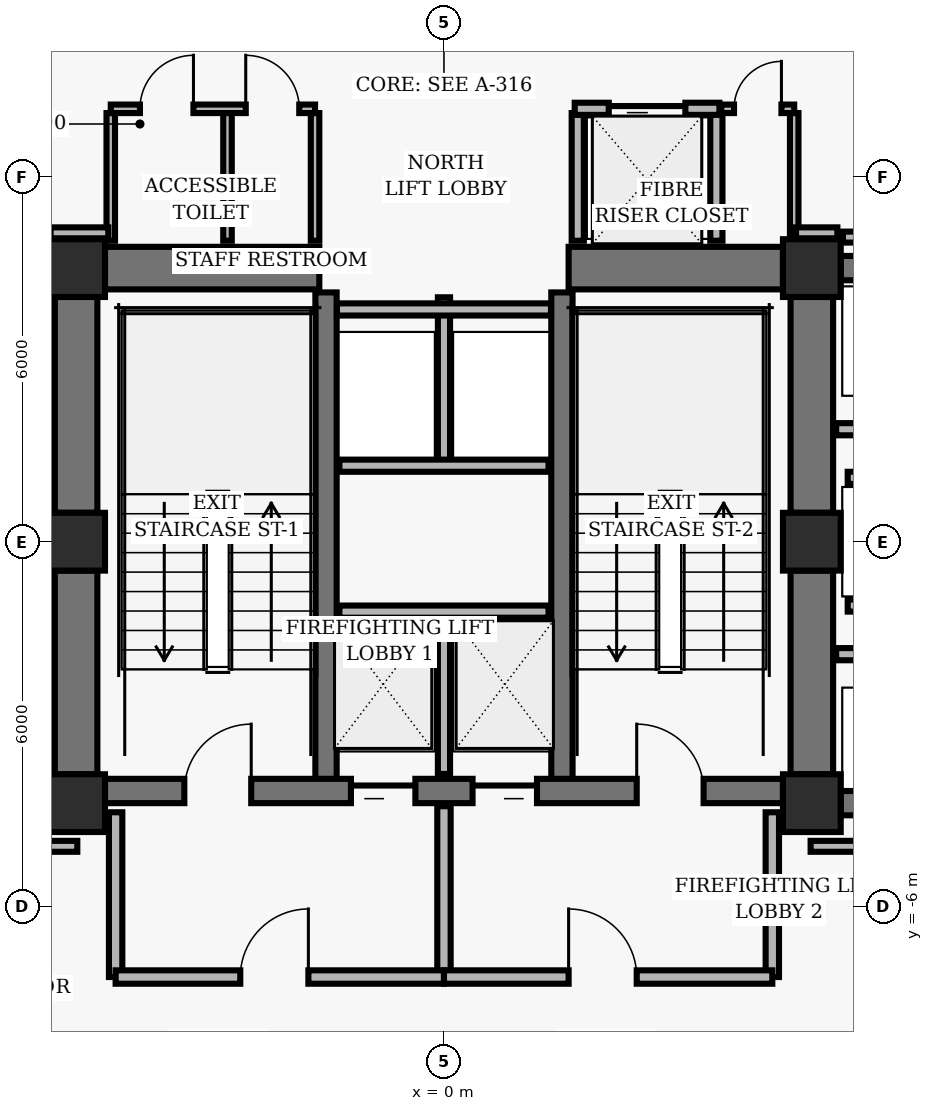
"""IFC4 building model, lengths in metres.
Left out: names, types, materials, properties, quantities, classifications, styles, units other than length and angle.
Written with IfcOpenShell. Run it as: python <this file> out.ifc"""

import sys

from ifc_helpers import new_model, si_unit, direction, frame, frame_2d, origin, origin_2d, place, context, subcontext, project, spatial, rectangle, hollow_rectangle, extrude, element, fill, save


model = new_model("IFC4")
c1 = context("Model", 3, precision=1e-05, world=origin(), true_north=direction((0.0, 1.0)))
c2 = subcontext(c1, "Body", "Model", "MODEL_VIEW")
j1 = project(units=[si_unit("LENGTHUNIT", "METRE"), si_unit("PLANEANGLEUNIT", "RADIAN")], contexts=[c1])
p1 = place(None, origin())
s1 = spatial("IfcSite", under=j1, at=p1, CompositionType="ELEMENT")
p2 = place(p1, origin())
s2 = spatial("IfcBuilding", under=s1, at=p2, CompositionType="ELEMENT")
p3 = place(p2, frame((0.0, 0.0, 59.68)))
s3 = spatial("IfcBuildingStorey", under=s2, at=p3, CompositionType="ELEMENT", Elevation=59.68)
for number, where, z_axis, x_axis in (
    (1, (-6.05, 4.5, 0.0), (0.0, 0.0, 1.0), (1.0, 0.0, 0.0)),
    (2, (6.05, 4.5, 0.0), (0.0, 0.0, 1.0), (1.0, 0.0, 0.0)),
    (3, (-6.05, 0.0, 0.0), (0.0, 0.0, 1.0), (1.0, 0.0, 0.0)),
    (4, (6.05, 0.0, 0.0), (0.0, 0.0, 1.0), (1.0, 0.0, 0.0)),
    (5, (-6.05, -4.3, 0.0), (0.0, 0.0, 1.0), (1.0, 0.0, 0.0)),
    (6, (6.05, -4.3, 0.0), (0.0, 0.0, 1.0), (1.0, 0.0, 0.0)),
):
    element("IfcColumn", number, at=place(p3, frame(where, z_axis=z_axis, x_axis=x_axis)), inside=s3, PredefinedType="COLUMN", context=c2, shape_type="SweptSolid", body=[
        extrude(hollow_rectangle(XDim=0.95, YDim=0.95, WallThickness=0.06, InnerFilletRadius=0.02, OuterFilletRadius=0.04, at=origin_2d()), origin(), (0.0, 0.0, 1.0), 3.36),
    ])
p4 = place(p3, frame((-6.05, 0.475, 0.0), z_axis=(0.0, 0.0, 1.0), x_axis=(0.0, 1.0, 0.0)))
e7 = element("IfcWall", 7, at=p4, inside=s3, PredefinedType="SHEAR", context=c2, shape_type="SweptSolid", body=[
    extrude(rectangle(XDim=3.55, YDim=0.7, at=frame_2d((1.775, 0.0))), origin(), (0.0, 0.0, 1.0), 3.098),
])
p5 = place(p3, frame((-6.05, -3.825, 0.0), z_axis=(0.0, 0.0, 1.0), x_axis=(0.0, 1.0, 0.0)))
e8 = element("IfcWall", 8, at=p5, inside=s3, PredefinedType="SHEAR", context=c2, shape_type="SweptSolid", body=[
    extrude(rectangle(XDim=3.35, YDim=0.7, at=frame_2d((1.675, 0.0))), origin(), (0.0, 0.0, 1.0), 3.098),
])
p6 = place(p3, frame((6.05, 0.475, 0.0), z_axis=(0.0, 0.0, 1.0), x_axis=(0.0, 1.0, 0.0)))
e9 = element("IfcWall", 9, at=p6, inside=s3, PredefinedType="SHEAR", context=c2, shape_type="SweptSolid", body=[
    extrude(rectangle(XDim=3.55, YDim=0.7, at=frame_2d((1.775, 0.0))), origin(), (0.0, 0.0, 1.0), 3.098),
])
p7 = place(p3, frame((6.05, -3.825, 0.0), z_axis=(0.0, 0.0, 1.0), x_axis=(0.0, 1.0, 0.0)))
e10 = element("IfcWall", 10, at=p7, inside=s3, PredefinedType="SHEAR", context=c2, shape_type="SweptSolid", body=[
    extrude(rectangle(XDim=3.35, YDim=0.7, at=frame_2d((1.675, 0.0))), origin(), (0.0, 0.0, 1.0), 3.098),
])
for number, where, z_axis, x_axis in (
    (11, (-1.94, -4.1, 0.0), (0.0, 0.0, 1.0), (0.0, 1.0, 0.0)),
    (12, (1.94, -4.1, 0.0), (0.0, 0.0, 1.0), (0.0, 1.0, 0.0)),
):
    element("IfcWall", number, at=place(p3, frame(where, z_axis=z_axis, x_axis=x_axis)), inside=s3, PredefinedType="SHEAR", context=c2, shape_type="SweptSolid", body=[
        extrude(rectangle(XDim=8.2, YDim=0.35, at=frame_2d((4.1, 0.0))), origin(), (0.0, 0.0, 1.0), 3.098),
    ])
p8 = place(p3, frame((-5.575, -4.1, 0.0), z_axis=(0.0, 0.0, 1.0), x_axis=(1.0, 0.0, 0.0)))
e13 = element("IfcWall", 13, at=p8, inside=s3, PredefinedType="SHEAR", context=c2, shape_type="SweptSolid", body=[
    extrude(rectangle(XDim=11.15, YDim=0.4, at=frame_2d((5.575, 0.0))), origin(), (0.0, 0.0, 1.0), 3.098),
])
p9 = place(p8, frame((1.305, 0.0, 0.0)))
e14 = element("IfcOpeningElement", 14, at=p9, cuts=e13, PredefinedType="OPENING", context=c2, shape_type="SweptSolid", body=[
    extrude(rectangle(XDim=1.1, YDim=2.04, at=frame_2d((0.55, 1.02))), frame((0.0, 0.21, 0.0), z_axis=(0.0, -1.0, 0.0), x_axis=(1.0, 0.0, 0.0)), (0.0, 0.0, 1.0), 0.42),
])
p10 = place(p8, frame((8.745, 0.0, 0.0)))
e15 = element("IfcOpeningElement", 15, at=p10, cuts=e13, PredefinedType="OPENING", context=c2, shape_type="SweptSolid", body=[
    extrude(rectangle(XDim=1.1, YDim=2.04, at=frame_2d((0.55, 1.02))), frame((0.0, 0.21, 0.0), z_axis=(0.0, -1.0, 0.0), x_axis=(1.0, 0.0, 0.0)), (0.0, 0.0, 1.0), 0.42),
])
p11 = place(p8, frame((4.045, 0.0, 0.0)))
e16 = element("IfcOpeningElement", 16, at=p11, cuts=e13, PredefinedType="OPENING", context=c2, shape_type="SweptSolid", body=[
    extrude(rectangle(XDim=1.06, YDim=2.04, at=frame_2d((0.53, 1.02))), frame((0.0, 0.21, 0.0), z_axis=(0.0, -1.0, 0.0), x_axis=(1.0, 0.0, 0.0)), (0.0, 0.0, 1.0), 0.42),
])
p12 = place(p8, frame((6.045, 0.0, 0.0)))
e17 = element("IfcOpeningElement", 17, at=p12, cuts=e13, PredefinedType="OPENING", context=c2, shape_type="SweptSolid", body=[
    extrude(rectangle(XDim=1.06, YDim=2.04, at=frame_2d((0.53, 1.02))), frame((0.0, 0.21, 0.0), z_axis=(0.0, -1.0, 0.0), x_axis=(1.0, 0.0, 0.0)), (0.0, 0.0, 1.0), 0.42),
])
for number, where, z_axis, x_axis in (
    (18, (-5.575, 4.5, 0.0), (0.0, 0.0, 1.0), (1.0, 0.0, 0.0)),
    (19, (2.05, 4.5, 0.0), (0.0, 0.0, 1.0), (1.0, 0.0, 0.0)),
):
    element("IfcWall", number, at=place(p3, frame(where, z_axis=z_axis, x_axis=x_axis)), inside=s3, PredefinedType="SHEAR", context=c2, shape_type="SweptSolid", body=[
        extrude(rectangle(XDim=3.525, YDim=0.7, at=frame_2d((1.762, 0.0))), origin(), (0.0, 0.0, 1.0), 3.098),
    ])
for number, where, z_axis, x_axis in (
    (20, (6.525, 4.5, 0.0), (0.0, 0.0, 1.0), (1.0, 0.0, 0.0)),
    (21, (6.525, -4.3, 0.0), (0.0, 0.0, 1.0), (1.0, 0.0, 0.0)),
):
    element("IfcWall", number, at=place(p3, frame(where, z_axis=z_axis, x_axis=x_axis)), inside=s3, PredefinedType="SHEAR", context=c2, shape_type="SweptSolid", body=[
        extrude(rectangle(XDim=1.95, YDim=0.4, at=frame_2d((0.975, 0.0))), origin(), (0.0, 0.0, 1.0), 3.098),
    ])
p13 = place(p3, frame((0.0, -3.82, 0.0), z_axis=(0.0, 0.0, 1.0), x_axis=(0.0, 1.0, 0.0)))
e22 = element("IfcWall", 22, at=p13, inside=s3, PredefinedType="PARTITIONING", context=c2, shape_type="SweptSolid", body=[
    extrude(rectangle(XDim=2.67, YDim=0.2, at=frame_2d((1.335, 0.0))), origin(), (0.0, 0.0, 1.0), 3.073),
])
p14 = place(p3, frame((-1.72, -1.15, 0.0), z_axis=(0.0, 0.0, 1.0), x_axis=(1.0, 0.0, 0.0)))
e23 = element("IfcWall", 23, at=p14, inside=s3, PredefinedType="PARTITIONING", context=c2, shape_type="SweptSolid", body=[
    extrude(rectangle(XDim=3.44, YDim=0.2, at=frame_2d((1.72, 0.0))), origin(), (0.0, 0.0, 1.0), 3.073),
])
for number, where, z_axis, x_axis in (
    (24, (-5.4, -7.16, 0.0), (0.0, 0.0, 1.0), (0.0, 1.0, 0.0)),
    (25, (5.4, -7.16, 0.0), (0.0, 0.0, 1.0), (0.0, 1.0, 0.0)),
):
    element("IfcWall", number, at=place(p3, frame(where, z_axis=z_axis, x_axis=x_axis)), inside=s3, PredefinedType="PARTITIONING", context=c2, shape_type="SweptSolid", body=[
        extrude(rectangle(XDim=2.71, YDim=0.22, at=frame_2d((1.355, 0.0))), origin(), (0.0, 0.0, 1.0), 3.073),
    ])
p15 = place(p3, frame((0.0, -7.16, 0.0), z_axis=(0.0, 0.0, 1.0), x_axis=(0.0, 1.0, 0.0)))
e26 = element("IfcWall", 26, at=p15, inside=s3, PredefinedType="PARTITIONING", context=c2, shape_type="SweptSolid", body=[
    extrude(rectangle(XDim=2.81, YDim=0.22, at=frame_2d((1.405, 0.0))), origin(), (0.0, 0.0, 1.0), 3.073),
])
p16 = place(p3, frame((-5.4, -7.16, 0.0), z_axis=(0.0, 0.0, 1.0), x_axis=(1.0, 0.0, 0.0)))
e27 = element("IfcWall", 27, at=p16, inside=s3, PredefinedType="PARTITIONING", context=c2, shape_type="SweptSolid", body=[
    extrude(rectangle(XDim=5.4, YDim=0.22, at=frame_2d((2.7, 0.0))), origin(), (0.0, 0.0, 1.0), 2.587),
])
p17 = place(p16, frame((2.05, 0.0, 0.0)))
e28 = element("IfcOpeningElement", 28, at=p17, cuts=e27, PredefinedType="OPENING", context=c2, shape_type="SweptSolid", body=[
    extrude(rectangle(XDim=1.12, YDim=2.02, at=frame_2d((0.56, 1.01))), frame((0.0, 0.12, 0.0), z_axis=(0.0, -1.0, 0.0), x_axis=(1.0, 0.0, 0.0)), (0.0, 0.0, 1.0), 0.24),
])
p18 = place(p3, frame((0.0, -7.16, 0.0), z_axis=(0.0, 0.0, 1.0), x_axis=(1.0, 0.0, 0.0)))
e29 = element("IfcWall", 29, at=p18, inside=s3, PredefinedType="PARTITIONING", context=c2, shape_type="SweptSolid", body=[
    extrude(rectangle(XDim=5.4, YDim=0.22, at=frame_2d((2.7, 0.0))), origin(), (0.0, 0.0, 1.0), 2.587),
])
p19 = place(p18, frame((2.05, 0.0, 0.0)))
e30 = element("IfcOpeningElement", 30, at=p19, cuts=e29, PredefinedType="OPENING", context=c2, shape_type="SweptSolid", body=[
    extrude(rectangle(XDim=1.12, YDim=2.02, at=frame_2d((0.56, 1.01))), frame((0.0, 0.12, 0.0), z_axis=(0.0, -1.0, 0.0), x_axis=(1.0, 0.0, 0.0)), (0.0, 0.0, 1.0), 0.24),
])
p20 = place(p3, frame((0.0, 1.25, 0.0), z_axis=(0.0, 0.0, 1.0), x_axis=(0.0, 1.0, 0.0)))
e31 = element("IfcWall", 31, at=p20, inside=s3, PredefinedType="PARTITIONING", context=c2, shape_type="SweptSolid", body=[
    extrude(rectangle(XDim=2.77, YDim=0.2, at=frame_2d((1.385, 0.0))), origin(), (0.0, 0.0, 1.0), 3.073),
])
p21 = place(p3, frame((-1.72, 1.25, 0.0), z_axis=(0.0, 0.0, 1.0), x_axis=(1.0, 0.0, 0.0)))
e32 = element("IfcWall", 32, at=p21, inside=s3, PredefinedType="PARTITIONING", context=c2, shape_type="SweptSolid", body=[
    extrude(rectangle(XDim=3.44, YDim=0.2, at=frame_2d((1.72, 0.0))), origin(), (0.0, 0.0, 1.0), 3.073),
])
p22 = place(p3, frame((-1.76, 3.82, 0.0), z_axis=(0.0, 0.0, 1.0), x_axis=(1.0, 0.0, 0.0)))
e33 = element("IfcWall", 33, at=p22, inside=s3, PredefinedType="PARTITIONING", context=c2, shape_type="SweptSolid", body=[
    extrude(rectangle(XDim=3.52, YDim=0.2, at=frame_2d((1.76, 0.0))), origin(), (0.0, 0.0, 1.0), 3.073),
])
for number, where, z_axis, x_axis in (
    (34, (2.2, 4.95, 0.0), (0.0, 0.0, 1.0), (0.0, 1.0, 0.0)),
    (35, (4.48, 4.95, 0.0), (0.0, 0.0, 1.0), (0.0, 1.0, 0.0)),
):
    element("IfcWall", number, at=place(p3, frame(where, z_axis=z_axis, x_axis=x_axis)), inside=s3, PredefinedType="PARTITIONING", context=c2, shape_type="SweptSolid", body=[
        extrude(rectangle(XDim=2.1, YDim=0.2, at=frame_2d((1.05, 0.0))), origin(), (0.0, 0.0, 1.0), 3.073),
    ])
p23 = place(p3, frame((2.15, 7.12, 0.0), z_axis=(0.0, 0.0, 1.0), x_axis=(1.0, 0.0, 0.0)))
e36 = element("IfcWall", 36, at=p23, inside=s3, PredefinedType="PARTITIONING", context=c2, shape_type="SweptSolid", body=[
    extrude(rectangle(XDim=2.38, YDim=0.2, at=frame_2d((1.19, 0.0))), origin(), (0.0, 0.0, 1.0), 2.587),
])
p24 = place(p23, frame((0.56, 0.0, 0.0)))
e37 = element("IfcOpeningElement", 37, at=p24, cuts=e36, PredefinedType="OPENING", context=c2, shape_type="SweptSolid", body=[
    extrude(rectangle(XDim=1.26, YDim=2.06, at=frame_2d((0.63, 1.03))), frame((0.0, 0.11, 0.0), z_axis=(0.0, -1.0, 0.0), x_axis=(1.0, 0.0, 0.0)), (0.0, 0.0, 1.0), 0.22),
])
for number, where, z_axis, x_axis in (
    (38, (-5.48, 4.95, 0.0), (0.0, 0.0, 1.0), (0.0, 1.0, 0.0)),
    (39, (-3.56, 4.95, 0.0), (0.0, 0.0, 1.0), (0.0, 1.0, 0.0)),
    (40, (-2.12, 4.95, 0.0), (0.0, 0.0, 1.0), (0.0, 1.0, 0.0)),
):
    element("IfcWall", number, at=place(p3, frame(where, z_axis=z_axis, x_axis=x_axis)), inside=s3, PredefinedType="PARTITIONING", context=c2, shape_type="SweptSolid", body=[
        extrude(rectangle(XDim=2.1, YDim=0.14, at=frame_2d((1.05, 0.0))), origin(), (0.0, 0.0, 1.0), 3.073),
    ])
p25 = place(p3, frame((-5.48, 7.12, 0.0), z_axis=(0.0, 0.0, 1.0), x_axis=(1.0, 0.0, 0.0)))
e41 = element("IfcWall", 41, at=p25, inside=s3, PredefinedType="PARTITIONING", context=c2, shape_type="SweptSolid", body=[
    extrude(rectangle(XDim=3.36, YDim=0.14, at=frame_2d((1.68, 0.0))), origin(), (0.0, 0.0, 1.0), 3.073),
])
p26 = place(p25, frame((0.48, 0.0, 0.0)))
e42 = element("IfcOpeningElement", 42, at=p26, cuts=e41, PredefinedType="OPENING", context=c2, shape_type="SweptSolid", body=[
    extrude(rectangle(XDim=0.88, YDim=2.02, at=frame_2d((0.44, 1.01))), frame((0.0, 0.08, 0.0), z_axis=(0.0, -1.0, 0.0), x_axis=(1.0, 0.0, 0.0)), (0.0, 0.0, 1.0), 0.16),
])
p27 = place(p25, frame((2.22, 0.0, 0.0)))
e43 = element("IfcOpeningElement", 43, at=p27, cuts=e41, PredefinedType="OPENING", context=c2, shape_type="SweptSolid", body=[
    extrude(rectangle(XDim=0.88, YDim=2.02, at=frame_2d((0.44, 1.01))), frame((0.0, 0.08, 0.0), z_axis=(0.0, -1.0, 0.0), x_axis=(1.0, 0.0, 0.0)), (0.0, 0.0, 1.0), 0.16),
])
p28 = place(p3, frame((5.76, 4.95, 0.0), z_axis=(0.0, 0.0, 1.0), x_axis=(0.0, 1.0, 0.0)))
e44 = element("IfcWall", 44, at=p28, inside=s3, PredefinedType="PARTITIONING", context=c2, shape_type="SweptSolid", body=[
    extrude(rectangle(XDim=2.1, YDim=0.14, at=frame_2d((1.05, 0.0))), origin(), (0.0, 0.0, 1.0), 3.073),
])
p29 = place(p3, frame((4.56, 7.12, 0.0), z_axis=(0.0, 0.0, 1.0), x_axis=(1.0, 0.0, 0.0)))
e45 = element("IfcWall", 45, at=p29, inside=s3, PredefinedType="PARTITIONING", context=c2, shape_type="SweptSolid", body=[
    extrude(rectangle(XDim=1.2, YDim=0.14, at=frame_2d((0.6, 0.0))), origin(), (0.0, 0.0, 1.0), 2.587),
])
p30 = place(p29, frame((0.21, 0.0, 0.0)))
e46 = element("IfcOpeningElement", 46, at=p30, cuts=e45, PredefinedType="OPENING", context=c2, shape_type="SweptSolid", body=[
    extrude(rectangle(XDim=0.78, YDim=2.01, at=frame_2d((0.39, 1.005))), frame((0.0, 0.08, 0.0), z_axis=(0.0, -1.0, 0.0), x_axis=(1.0, 0.0, 0.0)), (0.0, 0.0, 1.0), 0.16),
])
for number, where, z_axis, x_axis in (
    (47, (6.45, -1.85, 0.0), (0.0, 0.0, 1.0), (1.0, 0.0, 0.0)),
    (48, (6.45, 1.85, 0.0), (0.0, 0.0, 1.0), (1.0, 0.0, 0.0)),
):
    element("IfcWall", number, at=place(p3, frame(where, z_axis=z_axis, x_axis=x_axis)), inside=s3, PredefinedType="PARTITIONING", context=c2, shape_type="SweptSolid", body=[
        extrude(rectangle(XDim=2.1, YDim=0.2, at=frame_2d((1.05, 0.0))), origin(), (0.0, 0.0, 1.0), 3.073),
    ])
for number, where, z_axis, x_axis in (
    (49, (6.64, -1.05, 0.0), (0.0, 0.0, 1.0), (1.0, 0.0, 0.0)),
    (50, (6.64, 1.05, 0.0), (0.0, 0.0, 1.0), (1.0, 0.0, 0.0)),
):
    element("IfcWall", number, at=place(p3, frame(where, z_axis=z_axis, x_axis=x_axis)), inside=s3, PredefinedType="PARTITIONING", context=c2, shape_type="SweptSolid", body=[
        extrude(rectangle(XDim=1.91, YDim=0.2, at=frame_2d((0.955, 0.0))), origin(), (0.0, 0.0, 1.0), 3.073),
    ])
for number, where, z_axis, x_axis in (
    (51, (-9.37, -5.01, 0.0), (0.0, 0.0, 1.0), (1.0, 0.0, 0.0)),
    (52, (6.03, -5.01, 0.0), (0.0, 0.0, 1.0), (1.0, 0.0, 0.0)),
):
    element("IfcWall", number, at=place(p3, frame(where, z_axis=z_axis, x_axis=x_axis)), inside=s3, PredefinedType="PARTITIONING", context=c2, shape_type="SweptSolid", body=[
        extrude(rectangle(XDim=3.34, YDim=0.18, at=frame_2d((1.67, 0.0))), origin(), (0.0, 0.0, 1.0), 3.073),
    ])
p31 = place(p3, frame((9.37, 5.01, 0.0), z_axis=(0.0, 0.0, 1.0), x_axis=(-1.0, 0.0, 0.0)))
e53 = element("IfcWall", 53, at=p31, inside=s3, PredefinedType="PARTITIONING", context=c2, shape_type="SweptSolid", body=[
    extrude(rectangle(XDim=2.808, YDim=0.18, at=frame_2d((1.404, 0.0))), origin(), (0.0, 0.0, 1.0), 3.073),
])
p32 = place(p3, frame((6.47, 5.08, 0.0), z_axis=(0.0, 0.0, 1.0), x_axis=(-1.0, 0.0, 0.0)))
e54 = element("IfcWall", 54, at=p32, inside=s3, PredefinedType="PARTITIONING", context=c2, shape_type="SweptSolid", body=[
    extrude(rectangle(XDim=0.68, YDim=0.18, at=frame_2d((0.34, 0.0))), origin(), (0.0, 0.0, 1.0), 3.073),
])
p33 = place(p3, frame((-5.52, 5.08, 0.0), z_axis=(0.0, 0.0, 1.0), x_axis=(-1.0, 0.0, 0.0)))
e55 = element("IfcWall", 55, at=p33, inside=s3, PredefinedType="PARTITIONING", context=c2, shape_type="SweptSolid", body=[
    extrude(rectangle(XDim=0.95, YDim=0.18, at=frame_2d((0.475, 0.0))), origin(), (0.0, 0.0, 1.0), 3.073),
])
p34 = place(p9, origin())
e56 = element("IfcDoor", 56, at=p34, inside=s3, OperationType="SINGLE_SWING_RIGHT", PredefinedType="DOOR", context=c2, shape_type="SweptSolid", body=[
    extrude(rectangle(XDim=1.1, YDim=2.04, at=frame_2d((0.55, 1.02))), frame((0.0, 0.025, 0.0), z_axis=(0.0, -1.0, 0.0), x_axis=(1.0, 0.0, 0.0)), (0.0, 0.0, 1.0), 0.05),
])
fill(e14, e56)
p35 = place(p10, origin())
e57 = element("IfcDoor", 57, at=p35, inside=s3, OperationType="SINGLE_SWING_LEFT", PredefinedType="DOOR", context=c2, shape_type="SweptSolid", body=[
    extrude(rectangle(XDim=1.1, YDim=2.04, at=frame_2d((0.55, 1.02))), frame((0.0, 0.025, 0.0), z_axis=(0.0, -1.0, 0.0), x_axis=(1.0, 0.0, 0.0)), (0.0, 0.0, 1.0), 0.05),
])
fill(e15, e57)
p36 = place(p11, origin())
e58 = element("IfcDoor", 58, at=p36, inside=s3, OperationType="SLIDING_TO_LEFT", PredefinedType="DOOR", context=c2, shape_type="SweptSolid", body=[
    extrude(rectangle(XDim=1.06, YDim=2.04, at=frame_2d((0.53, 1.02))), frame((0.0, 0.025, 0.0), z_axis=(0.0, -1.0, 0.0), x_axis=(1.0, 0.0, 0.0)), (0.0, 0.0, 1.0), 0.05),
])
fill(e16, e58)
p37 = place(p12, origin())
e59 = element("IfcDoor", 59, at=p37, inside=s3, OperationType="SLIDING_TO_RIGHT", PredefinedType="DOOR", context=c2, shape_type="SweptSolid", body=[
    extrude(rectangle(XDim=1.06, YDim=2.04, at=frame_2d((0.53, 1.02))), frame((0.0, 0.025, 0.0), z_axis=(0.0, -1.0, 0.0), x_axis=(1.0, 0.0, 0.0)), (0.0, 0.0, 1.0), 0.05),
])
fill(e17, e59)
p38 = place(p17, origin())
e60 = element("IfcDoor", 60, at=p38, inside=s3, OperationType="SINGLE_SWING_RIGHT", PredefinedType="DOOR", context=c2, shape_type="SweptSolid", body=[
    extrude(rectangle(XDim=1.12, YDim=2.02, at=frame_2d((0.56, 1.01))), frame((0.0, 0.025, 0.0), z_axis=(0.0, -1.0, 0.0), x_axis=(1.0, 0.0, 0.0)), (0.0, 0.0, 1.0), 0.05),
])
fill(e28, e60)
p39 = place(p19, origin())
e61 = element("IfcDoor", 61, at=p39, inside=s3, OperationType="SINGLE_SWING_LEFT", PredefinedType="DOOR", context=c2, shape_type="SweptSolid", body=[
    extrude(rectangle(XDim=1.12, YDim=2.02, at=frame_2d((0.56, 1.01))), frame((0.0, 0.025, 0.0), z_axis=(0.0, -1.0, 0.0), x_axis=(1.0, 0.0, 0.0)), (0.0, 0.0, 1.0), 0.05),
])
fill(e30, e61)
p40 = place(p24, origin())
e62 = element("IfcDoor", 62, at=p40, inside=s3, OperationType="SLIDING_TO_LEFT", PredefinedType="DOOR", context=c2, shape_type="SweptSolid", body=[
    extrude(rectangle(XDim=1.26, YDim=2.06, at=frame_2d((0.63, 1.03))), frame((0.0, 0.025, 0.0), z_axis=(0.0, -1.0, 0.0), x_axis=(1.0, 0.0, 0.0)), (0.0, 0.0, 1.0), 0.05),
])
fill(e37, e62)
p41 = place(p26, origin())
e63 = element("IfcDoor", 63, at=p41, inside=s3, OperationType="SINGLE_SWING_RIGHT", PredefinedType="DOOR", context=c2, shape_type="SweptSolid", body=[
    extrude(rectangle(XDim=0.88, YDim=2.02, at=frame_2d((0.44, 1.01))), frame((0.0, 0.025, 0.0), z_axis=(0.0, -1.0, 0.0), x_axis=(1.0, 0.0, 0.0)), (0.0, 0.0, 1.0), 0.05),
])
fill(e42, e63)
p42 = place(p27, origin())
e64 = element("IfcDoor", 64, at=p42, inside=s3, OperationType="SINGLE_SWING_LEFT", PredefinedType="DOOR", context=c2, shape_type="SweptSolid", body=[
    extrude(rectangle(XDim=0.88, YDim=2.02, at=frame_2d((0.44, 1.01))), frame((0.0, 0.025, 0.0), z_axis=(0.0, -1.0, 0.0), x_axis=(1.0, 0.0, 0.0)), (0.0, 0.0, 1.0), 0.05),
])
fill(e43, e64)
p43 = place(p30, origin())
e65 = element("IfcDoor", 65, at=p43, inside=s3, OperationType="SINGLE_SWING_RIGHT", PredefinedType="DOOR", context=c2, shape_type="SweptSolid", body=[
    extrude(rectangle(XDim=0.78, YDim=2.01, at=frame_2d((0.39, 1.005))), frame((0.0, 0.025, 0.0), z_axis=(0.0, -1.0, 0.0), x_axis=(1.0, 0.0, 0.0)), (0.0, 0.0, 1.0), 0.05),
])
fill(e46, e65)
save(model, sys.argv[1])
